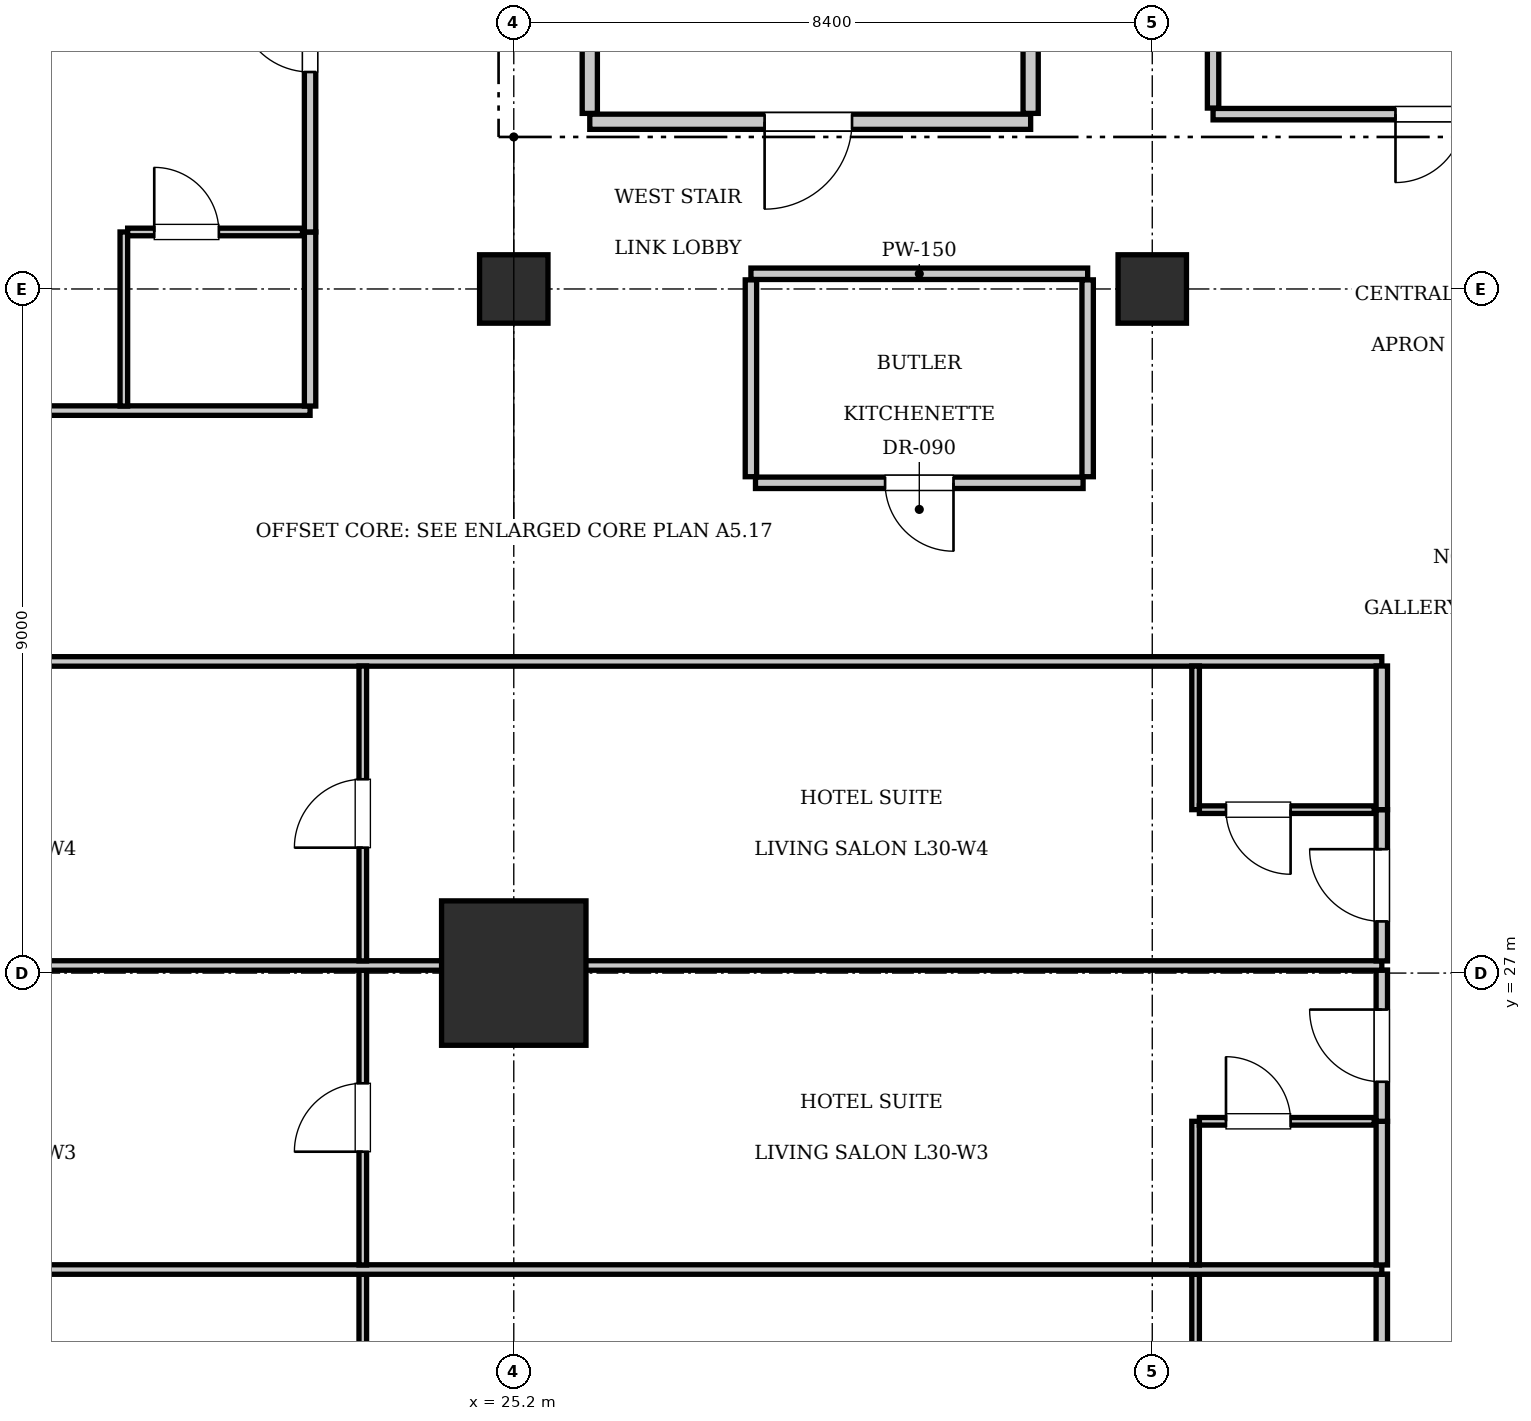
"""IFC4 building model, lengths in metres.
Left out: names, types, materials, properties, quantities, classifications, styles, units other than length and angle.
Written with IfcOpenShell. Run it as: python <this file> out.ifc"""

import sys

from ifc_helpers import new_model, si_unit, direction, frame, frame_2d, origin, origin_2d, place, context, subcontext, project, spatial, rectangle, extrude, element, fill, save


model = new_model("IFC4")
c1 = context("Model", 3, precision=1e-05, world=origin(), true_north=direction((0.0, 1.0)))
c2 = subcontext(c1, "Body", "Model", "MODEL_VIEW")
j1 = project(units=[si_unit("LENGTHUNIT", "METRE"), si_unit("PLANEANGLEUNIT", "RADIAN")], contexts=[c1])
p1 = place(None, origin())
s1 = spatial("IfcSite", under=j1, at=p1, CompositionType="ELEMENT")
p2 = place(p1, origin())
s2 = spatial("IfcBuilding", under=s1, at=p2, CompositionType="ELEMENT")
p3 = place(p2, frame((0.0, 0.0, 127.4)))
s3 = spatial("IfcBuildingStorey", under=s2, at=p3, CompositionType="ELEMENT", Elevation=127.4)
p4 = place(p3, frame((25.2, 27.0, 0.0), z_axis=(0.0, 0.0, 1.0), x_axis=(1.0, 0.0, 0.0)))
e1 = element("IfcColumn", 1, at=p4, inside=s3, PredefinedType="COLUMN", context=c2, shape_type="SweptSolid", body=[
    extrude(rectangle(XDim=1.9, YDim=1.9, at=origin_2d()), origin(), (0.0, 0.0, 1.0), 3.85),
])
for number, where, z_axis, x_axis in (
    (2, (25.2, 36.0, 0.0), (0.0, 0.0, 1.0), (1.0, 0.0, 0.0)),
    (3, (33.6, 36.0, 0.0), (0.0, 0.0, 1.0), (1.0, 0.0, 0.0)),
):
    element("IfcColumn", number, at=place(p3, frame(where, z_axis=z_axis, x_axis=x_axis)), inside=s3, PredefinedType="COLUMN", context=c2, shape_type="SweptSolid", body=[
        extrude(rectangle(XDim=0.9, YDim=0.9, at=origin_2d()), origin(), (0.0, 0.0, 1.0), 3.85),
    ])
p5 = place(p3, frame((26.2, 38.2, 0.0), z_axis=(0.0, 0.0, 1.0), x_axis=(1.0, 0.0, 0.0)))
e4 = element("IfcWall", 4, at=p5, inside=s3, PredefinedType="PARTITIONING", context=c2, shape_type="SweptSolid", body=[
    extrude(rectangle(XDim=5.8, YDim=0.2, at=frame_2d((2.9, 0.0))), origin(), (0.0, 0.0, 1.0), 3.61),
])
p6 = place(p5, frame((2.3, 0.0, 0.0)))
e5 = element("IfcOpeningElement", 5, at=p6, cuts=e4, PredefinedType="OPENING", context=c2, shape_type="SweptSolid", body=[
    extrude(rectangle(XDim=1.15, YDim=2.15, at=frame_2d((0.575, 1.075))), frame((0.0, 0.11, 0.0), z_axis=(0.0, -1.0, 0.0), x_axis=(1.0, 0.0, 0.0)), (0.0, 0.0, 1.0), 0.22),
])
for number, where, z_axis, x_axis in (
    (6, (26.2, 38.31, 0.0), (0.0, 0.0, 1.0), (0.0, 1.0, 0.0)),
    (7, (32.0, 38.31, 0.0), (0.0, 0.0, 1.0), (0.0, 1.0, 0.0)),
):
    element("IfcWall", number, at=place(p3, frame(where, z_axis=z_axis, x_axis=x_axis)), inside=s3, PredefinedType="PARTITIONING", context=c2, shape_type="SweptSolid", body=[
        extrude(rectangle(XDim=3.07, YDim=0.2, at=frame_2d((1.535, 0.0))), origin(), (0.0, 0.0, 1.0), 3.61),
    ])
p7 = place(p3, frame((34.4, 38.3, 0.0), z_axis=(0.0, 0.0, 1.0), x_axis=(1.0, 0.0, 0.0)))
e8 = element("IfcWall", 8, at=p7, inside=s3, PredefinedType="PARTITIONING", context=c2, shape_type="SweptSolid", body=[
    extrude(rectangle(XDim=5.92, YDim=0.15, at=frame_2d((2.96, 0.0))), origin(), (0.0, 0.0, 1.0), 3.61),
])
p8 = place(p7, frame((2.4, 0.0, 0.0)))
e9 = element("IfcOpeningElement", 9, at=p8, cuts=e8, PredefinedType="OPENING", context=c2, shape_type="SweptSolid", body=[
    extrude(rectangle(XDim=0.9, YDim=2.1, at=frame_2d((0.45, 1.05))), frame((0.0, 0.085, 0.0), z_axis=(0.0, -1.0, 0.0), x_axis=(1.0, 0.0, 0.0)), (0.0, 0.0, 1.0), 0.17),
])
p9 = place(p3, frame((34.4, 38.38, 0.0), z_axis=(0.0, 0.0, 1.0), x_axis=(0.0, 1.0, 0.0)))
e10 = element("IfcWall", 10, at=p9, inside=s3, PredefinedType="PARTITIONING", context=c2, shape_type="SweptSolid", body=[
    extrude(rectangle(XDim=2.84, YDim=0.15, at=frame_2d((1.42, 0.0))), origin(), (0.0, 0.0, 1.0), 3.61),
])
p10 = place(p3, frame((28.32, 36.2, 0.0), z_axis=(0.0, 0.0, 1.0), x_axis=(1.0, 0.0, 0.0)))
e11 = element("IfcWall", 11, at=p10, inside=s3, PredefinedType="PARTITIONING", context=c2, shape_type="SweptSolid", body=[
    extrude(rectangle(XDim=4.43, YDim=0.15, at=frame_2d((2.215, 0.0))), origin(), (0.0, 0.0, 1.0), 3.61),
])
for number, where, z_axis, x_axis in (
    (12, (28.32, 33.53, 0.0), (0.0, 0.0, 1.0), (0.0, 1.0, 0.0)),
    (13, (32.75, 33.53, 0.0), (0.0, 0.0, 1.0), (0.0, 1.0, 0.0)),
):
    element("IfcWall", number, at=place(p3, frame(where, z_axis=z_axis, x_axis=x_axis)), inside=s3, PredefinedType="PARTITIONING", context=c2, shape_type="SweptSolid", body=[
        extrude(rectangle(XDim=2.59, YDim=0.15, at=frame_2d((1.295, 0.0))), origin(), (0.0, 0.0, 1.0), 3.61),
    ])
p11 = place(p3, frame((28.38, 33.45, 0.0), z_axis=(0.0, 0.0, 1.0), x_axis=(1.0, 0.0, 0.0)))
e14 = element("IfcWall", 14, at=p11, inside=s3, PredefinedType="PARTITIONING", context=c2, shape_type="SweptSolid", body=[
    extrude(rectangle(XDim=4.31, YDim=0.15, at=frame_2d((2.155, 0.0))), origin(), (0.0, 0.0, 1.0), 3.61),
])
p12 = place(p11, frame((1.705, 0.0, 0.0)))
e15 = element("IfcOpeningElement", 15, at=p12, cuts=e14, PredefinedType="OPENING", context=c2, shape_type="SweptSolid", body=[
    extrude(rectangle(XDim=0.9, YDim=2.1, at=frame_2d((0.45, 1.05))), frame((0.0, 0.085, 0.0), z_axis=(0.0, -1.0, 0.0), x_axis=(1.0, 0.0, 0.0)), (0.0, 0.0, 1.0), 0.17),
])
p13 = place(p3, frame((13.2, 31.1, 0.0), z_axis=(0.0, 0.0, 1.0), x_axis=(1.0, 0.0, 0.0)))
e16 = element("IfcWall", 16, at=p13, inside=s3, PredefinedType="PARTITIONING", context=c2, shape_type="SweptSolid", body=[
    extrude(rectangle(XDim=23.42, YDim=0.125, at=frame_2d((11.71, 0.0))), origin(), (0.0, 0.0, 1.0), 3.61),
])
p14 = place(p3, frame((36.62, 21.15, 0.0), z_axis=(0.0, 0.0, 1.0), x_axis=(0.0, 1.0, 0.0)))
e17 = element("IfcWall", 17, at=p14, inside=s3, PredefinedType="PARTITIONING", context=c2, shape_type="SweptSolid", body=[
    extrude(rectangle(XDim=1.89, YDim=0.15, at=frame_2d((0.945, 0.0))), origin(), (0.0, 0.0, 1.0), 3.61),
])
p15 = place(p3, frame((34.17, 21.15, 0.0), z_axis=(0.0, 0.0, 1.0), x_axis=(0.0, 1.0, 0.0)))
e18 = element("IfcWall", 18, at=p15, inside=s3, PredefinedType="PARTITIONING", context=c2, shape_type="SweptSolid", body=[
    extrude(rectangle(XDim=1.89, YDim=0.1, at=frame_2d((0.945, 0.0))), origin(), (0.0, 0.0, 1.0), 3.61),
])
p16 = place(p3, frame((23.214, 19.16, 0.0), z_axis=(0.0, 0.0, 1.0), x_axis=(0.0, 1.0, 0.0)))
e19 = element("IfcWall", 19, at=p16, inside=s3, PredefinedType="PARTITIONING", context=c2, shape_type="SweptSolid", body=[
    extrude(rectangle(XDim=3.88, YDim=0.1, at=frame_2d((1.94, 0.0))), origin(), (0.0, 0.0, 1.0), 3.61),
])
p17 = place(p16, frame((1.49, 0.0, 0.0)))
e20 = element("IfcOpeningElement", 20, at=p17, cuts=e19, PredefinedType="OPENING", context=c2, shape_type="SweptSolid", body=[
    extrude(rectangle(XDim=0.9, YDim=2.1, at=frame_2d((0.45, 1.05))), frame((0.0, 0.06, 0.0), z_axis=(0.0, -1.0, 0.0), x_axis=(1.0, 0.0, 0.0)), (0.0, 0.0, 1.0), 0.12),
])
p18 = place(p3, frame((13.2, 23.1, 0.0), z_axis=(0.0, 0.0, 1.0), x_axis=(1.0, 0.0, 0.0)))
e21 = element("IfcWall", 21, at=p18, inside=s3, PredefinedType="PARTITIONING", context=c2, shape_type="SweptSolid", body=[
    extrude(rectangle(XDim=23.42, YDim=0.125, at=frame_2d((11.71, 0.0))), origin(), (0.0, 0.0, 1.0), 3.61),
])
p19 = place(p3, frame((36.62, 23.16, 0.0), z_axis=(0.0, 0.0, 1.0), x_axis=(0.0, 1.0, 0.0)))
e22 = element("IfcWall", 22, at=p19, inside=s3, PredefinedType="PARTITIONING", context=c2, shape_type="SweptSolid", body=[
    extrude(rectangle(XDim=1.89, YDim=0.15, at=frame_2d((0.945, 0.0))), origin(), (0.0, 0.0, 1.0), 3.61),
])
p20 = place(p3, frame((36.62, 25.05, 0.0), z_axis=(0.0, 0.0, 1.0), x_axis=(0.0, 1.0, 0.0)))
e23 = element("IfcWall", 23, at=p20, inside=s3, PredefinedType="PARTITIONING", context=c2, shape_type="SweptSolid", body=[
    extrude(rectangle(XDim=1.99, YDim=0.15, at=frame_2d((0.995, 0.0))), origin(), (0.0, 0.0, 1.0), 3.61),
])
p21 = place(p20, frame((0.52, 0.0, 0.0)))
e24 = element("IfcOpeningElement", 24, at=p21, cuts=e23, PredefinedType="OPENING", context=c2, shape_type="SweptSolid", body=[
    extrude(rectangle(XDim=0.95, YDim=2.15, at=frame_2d((0.475, 1.075))), frame((0.0, 0.085, 0.0), z_axis=(0.0, -1.0, 0.0), x_axis=(1.0, 0.0, 0.0)), (0.0, 0.0, 1.0), 0.17),
])
p22 = place(p3, frame((34.17, 23.16, 0.0), z_axis=(0.0, 0.0, 1.0), x_axis=(0.0, 1.0, 0.0)))
e25 = element("IfcWall", 25, at=p22, inside=s3, PredefinedType="PARTITIONING", context=c2, shape_type="SweptSolid", body=[
    extrude(rectangle(XDim=1.89, YDim=0.1, at=frame_2d((0.945, 0.0))), origin(), (0.0, 0.0, 1.0), 3.61),
])
p23 = place(p3, frame((34.22, 25.05, 0.0), z_axis=(0.0, 0.0, 1.0), x_axis=(1.0, 0.0, 0.0)))
e26 = element("IfcWall", 26, at=p23, inside=s3, PredefinedType="PARTITIONING", context=c2, shape_type="SweptSolid", body=[
    extrude(rectangle(XDim=2.3, YDim=0.1, at=frame_2d((1.15, 0.0))), origin(), (0.0, 0.0, 1.0), 3.61),
])
p24 = place(p23, frame((0.35, 0.0, 0.0)))
e27 = element("IfcOpeningElement", 27, at=p24, cuts=e26, PredefinedType="OPENING", context=c2, shape_type="SweptSolid", body=[
    extrude(rectangle(XDim=0.85, YDim=2.1, at=frame_2d((0.425, 1.05))), frame((0.0, 0.06, 0.0), z_axis=(0.0, -1.0, 0.0), x_axis=(1.0, 0.0, 0.0)), (0.0, 0.0, 1.0), 0.12),
])
p25 = place(p3, frame((23.214, 23.16, 0.0), z_axis=(0.0, 0.0, 1.0), x_axis=(0.0, 1.0, 0.0)))
e28 = element("IfcWall", 28, at=p25, inside=s3, PredefinedType="PARTITIONING", context=c2, shape_type="SweptSolid", body=[
    extrude(rectangle(XDim=3.88, YDim=0.1, at=frame_2d((1.94, 0.0))), origin(), (0.0, 0.0, 1.0), 3.61),
])
p26 = place(p25, frame((1.49, 0.0, 0.0)))
e29 = element("IfcOpeningElement", 29, at=p26, cuts=e28, PredefinedType="OPENING", context=c2, shape_type="SweptSolid", body=[
    extrude(rectangle(XDim=0.9, YDim=2.1, at=frame_2d((0.45, 1.05))), frame((0.0, 0.06, 0.0), z_axis=(0.0, -1.0, 0.0), x_axis=(1.0, 0.0, 0.0)), (0.0, 0.0, 1.0), 0.12),
])
p27 = place(p3, frame((13.2, 27.1, 0.0), z_axis=(0.0, 0.0, 1.0), x_axis=(1.0, 0.0, 0.0)))
e30 = element("IfcWall", 30, at=p27, inside=s3, PredefinedType="PARTITIONING", context=c2, shape_type="SweptSolid", body=[
    extrude(rectangle(XDim=23.42, YDim=0.125, at=frame_2d((11.71, 0.0))), origin(), (0.0, 0.0, 1.0), 2.41),
])
p28 = place(p3, frame((36.62, 27.16, 0.0), z_axis=(0.0, 0.0, 1.0), x_axis=(0.0, 1.0, 0.0)))
e31 = element("IfcWall", 31, at=p28, inside=s3, PredefinedType="PARTITIONING", context=c2, shape_type="SweptSolid", body=[
    extrude(rectangle(XDim=1.99, YDim=0.15, at=frame_2d((0.995, 0.0))), origin(), (0.0, 0.0, 1.0), 3.61),
])
p29 = place(p28, frame((0.52, 0.0, 0.0)))
e32 = element("IfcOpeningElement", 32, at=p29, cuts=e31, PredefinedType="OPENING", context=c2, shape_type="SweptSolid", body=[
    extrude(rectangle(XDim=0.95, YDim=2.15, at=frame_2d((0.475, 1.075))), frame((0.0, 0.085, 0.0), z_axis=(0.0, -1.0, 0.0), x_axis=(1.0, 0.0, 0.0)), (0.0, 0.0, 1.0), 0.17),
])
p30 = place(p3, frame((36.62, 29.15, 0.0), z_axis=(0.0, 0.0, 1.0), x_axis=(0.0, 1.0, 0.0)))
e33 = element("IfcWall", 33, at=p30, inside=s3, PredefinedType="PARTITIONING", context=c2, shape_type="SweptSolid", body=[
    extrude(rectangle(XDim=1.89, YDim=0.15, at=frame_2d((0.945, 0.0))), origin(), (0.0, 0.0, 1.0), 3.61),
])
p31 = place(p3, frame((34.17, 29.15, 0.0), z_axis=(0.0, 0.0, 1.0), x_axis=(0.0, 1.0, 0.0)))
e34 = element("IfcWall", 34, at=p31, inside=s3, PredefinedType="PARTITIONING", context=c2, shape_type="SweptSolid", body=[
    extrude(rectangle(XDim=1.89, YDim=0.1, at=frame_2d((0.945, 0.0))), origin(), (0.0, 0.0, 1.0), 3.61),
])
p32 = place(p3, frame((34.22, 29.15, 0.0), z_axis=(0.0, 0.0, 1.0), x_axis=(1.0, 0.0, 0.0)))
e35 = element("IfcWall", 35, at=p32, inside=s3, PredefinedType="PARTITIONING", context=c2, shape_type="SweptSolid", body=[
    extrude(rectangle(XDim=2.3, YDim=0.1, at=frame_2d((1.15, 0.0))), origin(), (0.0, 0.0, 1.0), 3.61),
])
p33 = place(p32, frame((0.35, 0.0, 0.0)))
e36 = element("IfcOpeningElement", 36, at=p33, cuts=e35, PredefinedType="OPENING", context=c2, shape_type="SweptSolid", body=[
    extrude(rectangle(XDim=0.85, YDim=2.1, at=frame_2d((0.425, 1.05))), frame((0.0, 0.06, 0.0), z_axis=(0.0, -1.0, 0.0), x_axis=(1.0, 0.0, 0.0)), (0.0, 0.0, 1.0), 0.12),
])
p34 = place(p3, frame((23.214, 27.16, 0.0), z_axis=(0.0, 0.0, 1.0), x_axis=(0.0, 1.0, 0.0)))
e37 = element("IfcWall", 37, at=p34, inside=s3, PredefinedType="PARTITIONING", context=c2, shape_type="SweptSolid", body=[
    extrude(rectangle(XDim=3.88, YDim=0.1, at=frame_2d((1.94, 0.0))), origin(), (0.0, 0.0, 1.0), 3.61),
])
p35 = place(p34, frame((1.49, 0.0, 0.0)))
e38 = element("IfcOpeningElement", 38, at=p35, cuts=e37, PredefinedType="OPENING", context=c2, shape_type="SweptSolid", body=[
    extrude(rectangle(XDim=0.9, YDim=2.1, at=frame_2d((0.45, 1.05))), frame((0.0, 0.06, 0.0), z_axis=(0.0, -1.0, 0.0), x_axis=(1.0, 0.0, 0.0)), (0.0, 0.0, 1.0), 0.12),
])
p36 = place(p3, frame((13.2, 34.4, 0.0), z_axis=(0.0, 0.0, 1.0), x_axis=(1.0, 0.0, 0.0)))
e39 = element("IfcWall", 39, at=p36, inside=s3, PredefinedType="PARTITIONING", context=c2, shape_type="SweptSolid", body=[
    extrude(rectangle(XDim=9.32, YDim=0.125, at=frame_2d((4.66, 0.0))), origin(), (0.0, 0.0, 1.0), 3.61),
])
p37 = place(p3, frame((22.52, 34.46, 0.0), z_axis=(0.0, 0.0, 1.0), x_axis=(0.0, 1.0, 0.0)))
e40 = element("IfcWall", 40, at=p37, inside=s3, PredefinedType="PARTITIONING", context=c2, shape_type="SweptSolid", body=[
    extrude(rectangle(XDim=2.29, YDim=0.15, at=frame_2d((1.145, 0.0))), origin(), (0.0, 0.0, 1.0), 3.61),
])
p38 = place(p3, frame((22.52, 36.75, 0.0), z_axis=(0.0, 0.0, 1.0), x_axis=(0.0, 1.0, 0.0)))
e41 = element("IfcWall", 41, at=p38, inside=s3, PredefinedType="PARTITIONING", context=c2, shape_type="SweptSolid", body=[
    extrude(rectangle(XDim=5.159, YDim=0.15, at=frame_2d((2.579, 0.0))), origin(), (0.0, 0.0, 1.0), 3.61),
])
p39 = place(p38, frame((2.104, 0.0, 0.0)))
e42 = element("IfcOpeningElement", 42, at=p39, cuts=e41, PredefinedType="OPENING", context=c2, shape_type="SweptSolid", body=[
    extrude(rectangle(XDim=0.95, YDim=2.15, at=frame_2d((0.475, 1.075))), frame((0.0, 0.085, 0.0), z_axis=(0.0, -1.0, 0.0), x_axis=(1.0, 0.0, 0.0)), (0.0, 0.0, 1.0), 0.17),
])
p40 = place(p3, frame((20.07, 34.46, 0.0), z_axis=(0.0, 0.0, 1.0), x_axis=(0.0, 1.0, 0.0)))
e43 = element("IfcWall", 43, at=p40, inside=s3, PredefinedType="PARTITIONING", context=c2, shape_type="SweptSolid", body=[
    extrude(rectangle(XDim=2.29, YDim=0.1, at=frame_2d((1.145, 0.0))), origin(), (0.0, 0.0, 1.0), 3.61),
])
p41 = place(p3, frame((20.12, 36.75, 0.0), z_axis=(0.0, 0.0, 1.0), x_axis=(1.0, 0.0, 0.0)))
e44 = element("IfcWall", 44, at=p41, inside=s3, PredefinedType="PARTITIONING", context=c2, shape_type="SweptSolid", body=[
    extrude(rectangle(XDim=2.3, YDim=0.1, at=frame_2d((1.15, 0.0))), origin(), (0.0, 0.0, 1.0), 3.61),
])
p42 = place(p41, frame((0.35, 0.0, 0.0)))
e45 = element("IfcOpeningElement", 45, at=p42, cuts=e44, PredefinedType="OPENING", context=c2, shape_type="SweptSolid", body=[
    extrude(rectangle(XDim=0.85, YDim=2.1, at=frame_2d((0.425, 1.05))), frame((0.0, 0.06, 0.0), z_axis=(0.0, -1.0, 0.0), x_axis=(1.0, 0.0, 0.0)), (0.0, 0.0, 1.0), 0.12),
])
p43 = place(p6, frame((1.15, 0.0, 0.0), z_axis=(0.0, 0.0, 1.0), x_axis=(-1.0, 0.0, 0.0)))
e46 = element("IfcDoor", 46, at=p43, inside=s3, OperationType="SINGLE_SWING_RIGHT", PredefinedType="DOOR", context=c2, shape_type="SweptSolid", body=[
    extrude(rectangle(XDim=1.15, YDim=2.15, at=frame_2d((0.575, 1.075))), frame((0.0, 0.025, 0.0), z_axis=(0.0, -1.0, 0.0), x_axis=(1.0, 0.0, 0.0)), (0.0, 0.0, 1.0), 0.05),
])
fill(e5, e46)
p44 = place(p8, frame((0.9, 0.0, 0.0), z_axis=(0.0, 0.0, 1.0), x_axis=(-1.0, 0.0, 0.0)))
e47 = element("IfcDoor", 47, at=p44, inside=s3, OperationType="SINGLE_SWING_RIGHT", PredefinedType="DOOR", context=c2, shape_type="SweptSolid", body=[
    extrude(rectangle(XDim=0.9, YDim=2.1, at=frame_2d((0.45, 1.05))), frame((0.0, 0.025, 0.0), z_axis=(0.0, -1.0, 0.0), x_axis=(1.0, 0.0, 0.0)), (0.0, 0.0, 1.0), 0.05),
])
fill(e9, e47)
p45 = place(p12, frame((0.9, 0.0, 0.0), z_axis=(0.0, 0.0, 1.0), x_axis=(-1.0, 0.0, 0.0)))
e48 = element("IfcDoor", 48, at=p45, inside=s3, OperationType="SINGLE_SWING_LEFT", PredefinedType="DOOR", context=c2, shape_type="SweptSolid", body=[
    extrude(rectangle(XDim=0.9, YDim=2.1, at=frame_2d((0.45, 1.05))), frame((0.0, 0.025, 0.0), z_axis=(0.0, -1.0, 0.0), x_axis=(1.0, 0.0, 0.0)), (0.0, 0.0, 1.0), 0.05),
])
fill(e15, e48)
p46 = place(p24, origin())
e49 = element("IfcDoor", 49, at=p46, inside=s3, OperationType="SINGLE_SWING_LEFT", PredefinedType="DOOR", context=c2, shape_type="SweptSolid", body=[
    extrude(rectangle(XDim=0.85, YDim=2.1, at=frame_2d((0.425, 1.05))), frame((0.0, 0.025, 0.0), z_axis=(0.0, -1.0, 0.0), x_axis=(1.0, 0.0, 0.0)), (0.0, 0.0, 1.0), 0.05),
])
fill(e27, e49)
p47 = place(p21, origin())
e50 = element("IfcDoor", 50, at=p47, inside=s3, OperationType="SINGLE_SWING_RIGHT", PredefinedType="DOOR", context=c2, shape_type="SweptSolid", body=[
    extrude(rectangle(XDim=0.95, YDim=2.15, at=frame_2d((0.475, 1.075))), frame((0.0, 0.025, 0.0), z_axis=(0.0, -1.0, 0.0), x_axis=(1.0, 0.0, 0.0)), (0.0, 0.0, 1.0), 0.05),
])
fill(e24, e50)
p48 = place(p26, origin())
e51 = element("IfcDoor", 51, at=p48, inside=s3, OperationType="SINGLE_SWING_LEFT", PredefinedType="DOOR", context=c2, shape_type="SweptSolid", body=[
    extrude(rectangle(XDim=0.9, YDim=2.1, at=frame_2d((0.45, 1.05))), frame((0.0, 0.025, 0.0), z_axis=(0.0, -1.0, 0.0), x_axis=(1.0, 0.0, 0.0)), (0.0, 0.0, 1.0), 0.05),
])
fill(e29, e51)
p49 = place(p33, frame((0.85, 0.0, 0.0), z_axis=(0.0, 0.0, 1.0), x_axis=(-1.0, 0.0, 0.0)))
e52 = element("IfcDoor", 52, at=p49, inside=s3, OperationType="SINGLE_SWING_LEFT", PredefinedType="DOOR", context=c2, shape_type="SweptSolid", body=[
    extrude(rectangle(XDim=0.85, YDim=2.1, at=frame_2d((0.425, 1.05))), frame((0.0, 0.025, 0.0), z_axis=(0.0, -1.0, 0.0), x_axis=(1.0, 0.0, 0.0)), (0.0, 0.0, 1.0), 0.05),
])
fill(e36, e52)
p50 = place(p29, origin())
e53 = element("IfcDoor", 53, at=p50, inside=s3, OperationType="SINGLE_SWING_RIGHT", PredefinedType="DOOR", context=c2, shape_type="SweptSolid", body=[
    extrude(rectangle(XDim=0.95, YDim=2.15, at=frame_2d((0.475, 1.075))), frame((0.0, 0.025, 0.0), z_axis=(0.0, -1.0, 0.0), x_axis=(1.0, 0.0, 0.0)), (0.0, 0.0, 1.0), 0.05),
])
fill(e32, e53)
p51 = place(p35, origin())
e54 = element("IfcDoor", 54, at=p51, inside=s3, OperationType="SINGLE_SWING_LEFT", PredefinedType="DOOR", context=c2, shape_type="SweptSolid", body=[
    extrude(rectangle(XDim=0.9, YDim=2.1, at=frame_2d((0.45, 1.05))), frame((0.0, 0.025, 0.0), z_axis=(0.0, -1.0, 0.0), x_axis=(1.0, 0.0, 0.0)), (0.0, 0.0, 1.0), 0.05),
])
fill(e38, e54)
p52 = place(p42, origin())
e55 = element("IfcDoor", 55, at=p52, inside=s3, OperationType="SINGLE_SWING_LEFT", PredefinedType="DOOR", context=c2, shape_type="SweptSolid", body=[
    extrude(rectangle(XDim=0.85, YDim=2.1, at=frame_2d((0.425, 1.05))), frame((0.0, 0.025, 0.0), z_axis=(0.0, -1.0, 0.0), x_axis=(1.0, 0.0, 0.0)), (0.0, 0.0, 1.0), 0.05),
])
fill(e45, e55)
p53 = place(p39, origin())
e56 = element("IfcDoor", 56, at=p53, inside=s3, OperationType="SINGLE_SWING_RIGHT", PredefinedType="DOOR", context=c2, shape_type="SweptSolid", body=[
    extrude(rectangle(XDim=0.95, YDim=2.15, at=frame_2d((0.475, 1.075))), frame((0.0, 0.025, 0.0), z_axis=(0.0, -1.0, 0.0), x_axis=(1.0, 0.0, 0.0)), (0.0, 0.0, 1.0), 0.05),
])
fill(e42, e56)
save(model, sys.argv[1])
